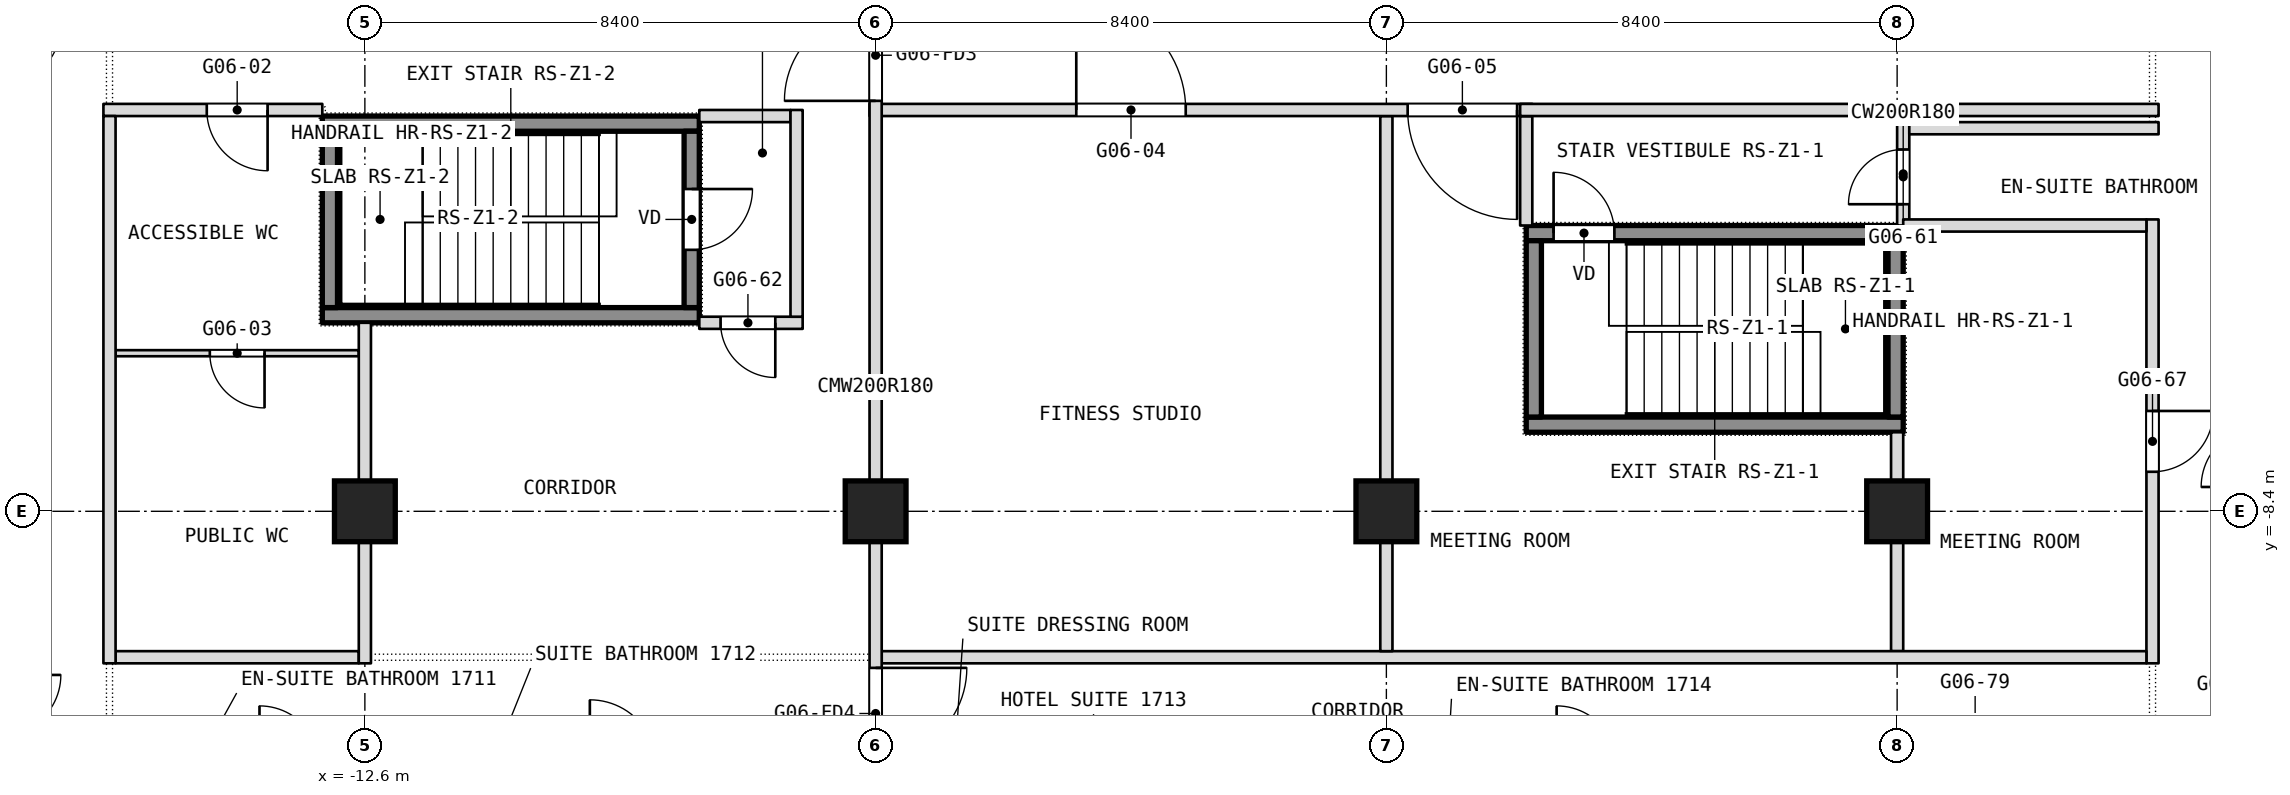
"""IFC4 building model, lengths in metres.
Left out: names, types, materials, properties, quantities, classifications, styles, units other than length and angle.
Written with IfcOpenShell. Run it as: python <this file> out.ifc"""

import sys

from ifc_helpers import new_model, si_unit, direction, frame, frame_2d, origin, origin_2d, place, context, subcontext, project, spatial, rectangle, extrude, element, fill, save


model = new_model("IFC4")
c1 = context("Model", 3, precision=1e-05, world=origin(), true_north=direction((0.0, 1.0)))
c2 = subcontext(c1, "Body", "Model", "MODEL_VIEW")
j1 = project(units=[si_unit("LENGTHUNIT", "METRE"), si_unit("PLANEANGLEUNIT", "RADIAN")], contexts=[c1])
p1 = place(None, origin())
s1 = spatial("IfcSite", under=j1, at=p1, CompositionType="ELEMENT")
p2 = place(p1, origin())
s2 = spatial("IfcBuilding", under=s1, at=p2, CompositionType="ELEMENT")
p3 = place(p2, frame((0.0, 0.0, 76.1)))
s3 = spatial("IfcBuildingStorey", under=s2, at=p3, CompositionType="ELEMENT", Elevation=76.1)
for number, where, z_axis, x_axis in (
    (1, (-12.6, -8.4, 0.0), (0.0, 0.0, 1.0), (1.0, 0.0, 0.0)),
    (2, (-4.2, -8.4, 0.0), (0.0, 0.0, 1.0), (1.0, 0.0, 0.0)),
    (3, (4.2, -8.4, 0.0), (0.0, 0.0, 1.0), (1.0, 0.0, 0.0)),
    (4, (12.6, -8.4, 0.0), (0.0, 0.0, 1.0), (1.0, 0.0, 0.0)),
):
    element("IfcColumn", number, at=place(p3, frame(where, z_axis=z_axis, x_axis=x_axis)), inside=s3, PredefinedType="COLUMN", context=c2, shape_type="SweptSolid", body=[
        extrude(rectangle(XDim=1.0, YDim=1.0, at=origin_2d()), origin(), (0.0, 0.0, 1.0), 3.6),
    ])
p4 = place(p3, frame((16.8, -10.9, 0.0), z_axis=(0.0, 0.0, 1.0), x_axis=(0.0, 1.0, 0.0)))
e5 = element("IfcWall", 5, at=p4, inside=s3, PredefinedType="PARTITIONING", context=c2, shape_type="SweptSolid", body=[
    extrude(rectangle(XDim=7.3, YDim=0.2, at=frame_2d((3.65, 0.0))), origin(), (0.0, 0.0, 1.0), 3.34),
])
p5 = place(p4, frame((3.15, 0.0, 0.0)))
e6 = element("IfcOpeningElement", 6, at=p5, cuts=e5, PredefinedType="OPENING", context=c2, shape_type="SweptSolid", body=[
    extrude(rectangle(XDim=1.0, YDim=2.1, at=frame_2d((0.5, 1.05))), frame((0.0, 0.1, 0.0), z_axis=(0.0, -1.0, 0.0), x_axis=(1.0, 0.0, 0.0)), (0.0, 0.0, 1.0), 0.2),
])
p6 = place(p3, frame((12.7, -3.7, 0.0), z_axis=(0.0, 0.0, 1.0), x_axis=(0.0, 1.0, 0.0)))
e7 = element("IfcWall", 7, at=p6, inside=s3, PredefinedType="PARTITIONING", context=c2, shape_type="SweptSolid", body=[
    extrude(rectangle(XDim=1.7, YDim=0.2, at=frame_2d((0.85, 0.0))), origin(), (0.0, 0.0, 1.0), 3.34),
])
p7 = place(p6, frame((0.35, 0.0, 0.0)))
e8 = element("IfcOpeningElement", 8, at=p7, cuts=e7, PredefinedType="OPENING", context=c2, shape_type="SweptSolid", body=[
    extrude(rectangle(XDim=0.9, YDim=2.1, at=frame_2d((0.45, 1.05))), frame((0.0, 0.1, 0.0), z_axis=(0.0, -1.0, 0.0), x_axis=(1.0, 0.0, 0.0)), (0.0, 0.0, 1.0), 0.2),
])
p8 = place(p3, frame((12.6, -10.7, 0.0), z_axis=(0.0, 0.0, 1.0), x_axis=(0.0, 1.0, 0.0)))
e9 = element("IfcWall", 9, at=p8, inside=s3, PredefinedType="PARTITIONING", context=c2, shape_type="SweptSolid", body=[
    extrude(rectangle(XDim=3.6, YDim=0.2, at=frame_2d((1.8, 0.0))), origin(), (0.0, 0.0, 1.0), 3.34),
])
p9 = place(p3, frame((-16.7, -10.8, 0.0), z_axis=(0.0, 0.0, 1.0), x_axis=(1.0, 0.0, 0.0)))
e10 = element("IfcWall", 10, at=p9, inside=s3, PredefinedType="PARTITIONING", context=c2, shape_type="SweptSolid", body=[
    extrude(rectangle(XDim=4.0, YDim=0.2, at=frame_2d((2.0, 0.0))), origin(), (0.0, 0.0, 1.0), 3.34),
])
p10 = place(p3, frame((-4.1, -10.8, 0.0), z_axis=(0.0, 0.0, 1.0), x_axis=(1.0, 0.0, 0.0)))
e11 = element("IfcWall", 11, at=p10, inside=s3, PredefinedType="PARTITIONING", context=c2, shape_type="SweptSolid", body=[
    extrude(rectangle(XDim=20.8, YDim=0.2, at=frame_2d((10.4, 0.0))), origin(), (0.0, 0.0, 1.0), 3.34),
])
p11 = place(p3, frame((6.5, -3.7, 0.0), z_axis=(0.0, 0.0, 1.0), x_axis=(0.0, 1.0, 0.0)))
e12 = element("IfcWall", 12, at=p11, inside=s3, PredefinedType="PARTITIONING", context=c2, shape_type="SweptSolid", body=[
    extrude(rectangle(XDim=1.8, YDim=0.2, at=frame_2d((0.9, 0.0))), origin(), (0.0, 0.0, 1.0), 3.34),
])
p12 = place(p3, frame((-16.7, -5.8, 0.0), z_axis=(0.0, 0.0, 1.0), x_axis=(1.0, 0.0, 0.0)))
e13 = element("IfcWall", 13, at=p12, inside=s3, PredefinedType="PARTITIONING", context=c2, shape_type="SweptSolid", body=[
    extrude(rectangle(XDim=4.0, YDim=0.1, at=frame_2d((2.0, 0.0))), origin(), (0.0, 0.0, 1.0), 3.34),
])
p13 = place(p12, frame((1.55, 0.0, 0.0)))
e14 = element("IfcOpeningElement", 14, at=p13, cuts=e13, PredefinedType="OPENING", context=c2, shape_type="SweptSolid", body=[
    extrude(rectangle(XDim=0.9, YDim=2.1, at=frame_2d((0.45, 1.05))), frame((0.0, 0.05, 0.0), z_axis=(0.0, -1.0, 0.0), x_axis=(1.0, 0.0, 0.0)), (0.0, 0.0, 1.0), 0.1),
])
p14 = place(p3, frame((-7.1, -5.3, 0.0), z_axis=(0.0, 0.0, 1.0), x_axis=(1.0, 0.0, 0.0)))
e15 = element("IfcWall", 15, at=p14, inside=s3, PredefinedType="PARTITIONING", context=c2, shape_type="SweptSolid", body=[
    extrude(rectangle(XDim=1.7, YDim=0.2, at=frame_2d((0.85, 0.0))), origin(), (0.0, 0.0, 1.0), 3.34),
])
p15 = place(p14, frame((0.35, 0.0, 0.0)))
e16 = element("IfcOpeningElement", 16, at=p15, cuts=e15, PredefinedType="OPENING", context=c2, shape_type="SweptSolid", body=[
    extrude(rectangle(XDim=0.9, YDim=2.1, at=frame_2d((0.45, 1.05))), frame((0.0, 0.1, 0.0), z_axis=(0.0, -1.0, 0.0), x_axis=(1.0, 0.0, 0.0)), (0.0, 0.0, 1.0), 0.2),
])
p16 = place(p3, frame((4.2, -10.7, 0.0), z_axis=(0.0, 0.0, 1.0), x_axis=(0.0, 1.0, 0.0)))
e17 = element("IfcWall", 17, at=p16, inside=s3, PredefinedType="PARTITIONING", context=c2, shape_type="SweptSolid", body=[
    extrude(rectangle(XDim=8.8, YDim=0.2, at=frame_2d((4.4, 0.0))), origin(), (0.0, 0.0, 1.0), 3.34),
])
p17 = place(p3, frame((12.7, -3.7, 0.0), z_axis=(0.0, 0.0, 1.0), x_axis=(1.0, 0.0, 0.0)))
e18 = element("IfcWall", 18, at=p17, inside=s3, PredefinedType="PARTITIONING", context=c2, shape_type="SweptSolid", body=[
    extrude(rectangle(XDim=4.0, YDim=0.2, at=frame_2d((2.0, 0.0))), origin(), (0.0, 0.0, 1.0), 3.34),
])
p18 = place(p3, frame((12.8, -2.1, 0.0), z_axis=(0.0, 0.0, 1.0), x_axis=(1.0, 0.0, 0.0)))
e19 = element("IfcWall", 19, at=p18, inside=s3, PredefinedType="PARTITIONING", context=c2, shape_type="SweptSolid", body=[
    extrude(rectangle(XDim=4.1, YDim=0.2, at=frame_2d((2.05, 0.0))), origin(), (0.0, 0.0, 1.0), 3.34),
])
p19 = place(p3, frame((-7.1, -1.9, 0.0), z_axis=(0.0, 0.0, 1.0), x_axis=(1.0, 0.0, 0.0)))
e20 = element("IfcWall", 20, at=p19, inside=s3, PredefinedType="PARTITIONING", context=c2, shape_type="SweptSolid", body=[
    extrude(rectangle(XDim=1.5, YDim=0.2, at=frame_2d((0.75, 0.0))), origin(), (0.0, 0.0, 1.0), 3.34),
])
p20 = place(p3, frame((-16.9, -1.8, 0.0), z_axis=(0.0, 0.0, 1.0), x_axis=(1.0, 0.0, 0.0)))
e21 = element("IfcWall", 21, at=p20, inside=s3, PredefinedType="PARTITIONING", context=c2, shape_type="SweptSolid", body=[
    extrude(rectangle(XDim=3.6, YDim=0.2, at=frame_2d((1.8, 0.0))), origin(), (0.0, 0.0, 1.0), 3.34),
])
p21 = place(p20, frame((1.7, 0.0, 0.0)))
e22 = element("IfcOpeningElement", 22, at=p21, cuts=e21, PredefinedType="OPENING", context=c2, shape_type="SweptSolid", body=[
    extrude(rectangle(XDim=1.0, YDim=2.1, at=frame_2d((0.5, 1.05))), frame((0.0, 0.1, 0.0), z_axis=(0.0, -1.0, 0.0), x_axis=(1.0, 0.0, 0.0)), (0.0, 0.0, 1.0), 0.2),
])
p22 = place(p3, frame((-4.3, -1.8, 0.0), z_axis=(0.0, 0.0, 1.0), x_axis=(1.0, 0.0, 0.0)))
e23 = element("IfcWall", 23, at=p22, inside=s3, PredefinedType="PARTITIONING", context=c2, shape_type="SweptSolid", body=[
    extrude(rectangle(XDim=10.9, YDim=0.2, at=frame_2d((5.45, 0.0))), origin(), (0.0, 0.0, 1.0), 3.34),
])
p23 = place(p22, frame((3.4, 0.0, 0.0)))
e24 = element("IfcOpeningElement", 24, at=p23, cuts=e23, PredefinedType="OPENING", context=c2, shape_type="SweptSolid", body=[
    extrude(rectangle(XDim=1.8, YDim=2.1, at=frame_2d((0.9, 1.05))), frame((0.0, 0.1, 0.0), z_axis=(0.0, -1.0, 0.0), x_axis=(1.0, 0.0, 0.0)), (0.0, 0.0, 1.0), 0.2),
])
p24 = place(p22, frame((8.85, 0.0, 0.0)))
e25 = element("IfcOpeningElement", 25, at=p24, cuts=e23, PredefinedType="OPENING", context=c2, shape_type="SweptSolid", body=[
    extrude(rectangle(XDim=1.8, YDim=2.1, at=frame_2d((0.9, 1.05))), frame((0.0, 0.1, 0.0), z_axis=(0.0, -1.0, 0.0), x_axis=(1.0, 0.0, 0.0)), (0.0, 0.0, 1.0), 0.2),
])
p25 = place(p3, frame((6.4, -1.8, 0.0), z_axis=(0.0, 0.0, 1.0), x_axis=(1.0, 0.0, 0.0)))
e26 = element("IfcWall", 26, at=p25, inside=s3, PredefinedType="PARTITIONING", context=c2, shape_type="SweptSolid", body=[
    extrude(rectangle(XDim=10.5, YDim=0.2, at=frame_2d((5.25, 0.0))), origin(), (0.0, 0.0, 1.0), 3.34),
])
p26 = place(p3, frame((-4.2, -12.7, 0.0), z_axis=(0.0, 0.0, 1.0), x_axis=(0.0, 1.0, 0.0)))
e27 = element("IfcWall", 27, at=p26, inside=s3, PredefinedType="PARTITIONING", context=c2, shape_type="SweptSolid", body=[
    extrude(rectangle(XDim=12.7, YDim=0.2, at=frame_2d((6.35, 0.0))), origin(), (0.0, 0.0, 1.0), 3.34),
])
p27 = place(p26, frame((11.05, 0.0, 0.0)))
e28 = element("IfcOpeningElement", 28, at=p27, cuts=e27, PredefinedType="OPENING", context=c2, shape_type="SweptSolid", body=[
    extrude(rectangle(XDim=1.5, YDim=2.1, at=frame_2d((0.75, 1.05))), frame((0.0, 0.1, 0.0), z_axis=(0.0, -1.0, 0.0), x_axis=(1.0, 0.0, 0.0)), (0.0, 0.0, 1.0), 0.2),
])
p28 = place(p26, frame((0.225, 0.0, 0.0)))
e29 = element("IfcOpeningElement", 29, at=p28, cuts=e27, PredefinedType="OPENING", context=c2, shape_type="SweptSolid", body=[
    extrude(rectangle(XDim=1.5, YDim=2.1, at=frame_2d((0.75, 1.05))), frame((0.0, 0.1, 0.0), z_axis=(0.0, -1.0, 0.0), x_axis=(1.0, 0.0, 0.0)), (0.0, 0.0, 1.0), 0.2),
])
p29 = place(p3, frame((-5.5, -5.2, 0.0), z_axis=(0.0, 0.0, 1.0), x_axis=(0.0, 1.0, 0.0)))
e30 = element("IfcWall", 30, at=p29, inside=s3, PredefinedType="PARTITIONING", context=c2, shape_type="SweptSolid", body=[
    extrude(rectangle(XDim=3.4, YDim=0.2, at=frame_2d((1.7, 0.0))), origin(), (0.0, 0.0, 1.0), 3.34),
])
p30 = place(p3, frame((-12.6, -10.9, 0.0), z_axis=(0.0, 0.0, 1.0), x_axis=(0.0, 1.0, 0.0)))
e31 = element("IfcWall", 31, at=p30, inside=s3, PredefinedType="PARTITIONING", context=c2, shape_type="SweptSolid", body=[
    extrude(rectangle(XDim=5.6, YDim=0.2, at=frame_2d((2.8, 0.0))), origin(), (0.0, 0.0, 1.0), 3.34),
])
p31 = place(p3, frame((-16.8, -10.9, 0.0), z_axis=(0.0, 0.0, 1.0), x_axis=(0.0, 1.0, 0.0)))
e32 = element("IfcWall", 32, at=p31, inside=s3, PredefinedType="PARTITIONING", context=c2, shape_type="SweptSolid", body=[
    extrude(rectangle(XDim=9.0, YDim=0.2, at=frame_2d((4.5, 0.0))), origin(), (0.0, 0.0, 1.0), 3.34),
])
p32 = place(p3, frame((6.5, -6.975, 0.1), z_axis=(0.0, 0.0, 1.0), x_axis=(1.0, 0.0, 0.0)))
e33 = element("IfcWall", 33, at=p32, inside=s3, PredefinedType="SHEAR", context=c2, shape_type="SweptSolid", body=[
    extrude(rectangle(XDim=6.2, YDim=0.25, at=frame_2d((3.1, 0.0))), origin(), (0.0, 0.0, 1.0), 3.6),
])
p33 = place(p3, frame((6.5, -3.825, 0.1), z_axis=(0.0, 0.0, 1.0), x_axis=(1.0, 0.0, 0.0)))
e34 = element("IfcWall", 34, at=p33, inside=s3, PredefinedType="SHEAR", context=c2, shape_type="SweptSolid", body=[
    extrude(rectangle(XDim=6.2, YDim=0.25, at=frame_2d((3.1, 0.0))), origin(), (0.0, 0.0, 1.0), 3.6),
])
p34 = place(p33, frame((0.45, 0.0, 0.0)))
e35 = element("IfcOpeningElement", 35, at=p34, cuts=e34, PredefinedType="OPENING", context=c2, shape_type="SweptSolid", body=[
    extrude(rectangle(XDim=1.0, YDim=2.1, at=frame_2d((0.5, 1.05))), frame((0.0, 0.125, 0.0), z_axis=(0.0, -1.0, 0.0), x_axis=(1.0, 0.0, 0.0)), (0.0, 0.0, 1.0), 0.25),
])
for number, where, z_axis, x_axis in (
    (36, (6.625, -6.85, 0.1), (0.0, 0.0, 1.0), (0.0, 1.0, 0.0)),
    (37, (12.575, -6.85, 0.1), (0.0, 0.0, 1.0), (0.0, 1.0, 0.0)),
):
    element("IfcWall", number, at=place(p3, frame(where, z_axis=z_axis, x_axis=x_axis)), inside=s3, PredefinedType="SHEAR", context=c2, shape_type="SweptSolid", body=[
        extrude(rectangle(XDim=2.9, YDim=0.25, at=frame_2d((1.45, 0.0))), origin(), (0.0, 0.0, 1.0), 3.6),
    ])
for number, where, z_axis, x_axis in (
    (38, (-13.3, -5.175, 0.1), (0.0, 0.0, 1.0), (1.0, 0.0, 0.0)),
    (39, (-13.3, -2.025, 0.1), (0.0, 0.0, 1.0), (1.0, 0.0, 0.0)),
):
    element("IfcWall", number, at=place(p3, frame(where, z_axis=z_axis, x_axis=x_axis)), inside=s3, PredefinedType="SHEAR", context=c2, shape_type="SweptSolid", body=[
        extrude(rectangle(XDim=6.2, YDim=0.25, at=frame_2d((3.1, 0.0))), origin(), (0.0, 0.0, 1.0), 3.6),
    ])
p35 = place(p3, frame((-13.175, -5.05, 0.1), z_axis=(0.0, 0.0, 1.0), x_axis=(0.0, 1.0, 0.0)))
e40 = element("IfcWall", 40, at=p35, inside=s3, PredefinedType="SHEAR", context=c2, shape_type="SweptSolid", body=[
    extrude(rectangle(XDim=2.9, YDim=0.25, at=frame_2d((1.45, 0.0))), origin(), (0.0, 0.0, 1.0), 3.6),
])
p36 = place(p3, frame((-7.225, -5.05, 0.1), z_axis=(0.0, 0.0, 1.0), x_axis=(0.0, 1.0, 0.0)))
e41 = element("IfcWall", 41, at=p36, inside=s3, PredefinedType="SHEAR", context=c2, shape_type="SweptSolid", body=[
    extrude(rectangle(XDim=2.9, YDim=0.25, at=frame_2d((1.45, 0.0))), origin(), (0.0, 0.0, 1.0), 3.6),
])
p37 = place(p36, frame((0.95, 0.0, 0.0)))
e42 = element("IfcOpeningElement", 42, at=p37, cuts=e41, PredefinedType="OPENING", context=c2, shape_type="SweptSolid", body=[
    extrude(rectangle(XDim=1.0, YDim=2.1, at=frame_2d((0.5, 1.05))), frame((0.0, 0.125, 0.0), z_axis=(0.0, -1.0, 0.0), x_axis=(1.0, 0.0, 0.0)), (0.0, 0.0, 1.0), 0.25),
])
p38 = place(p5, origin())
e43 = element("IfcDoor", 43, at=p38, inside=s3, OperationType="SINGLE_SWING_LEFT", PredefinedType="DOOR", context=c2, shape_type="SweptSolid", body=[
    extrude(rectangle(XDim=1.0, YDim=2.1, at=frame_2d((0.5, 1.05))), frame((0.0, 0.025, 0.0), z_axis=(0.0, -1.0, 0.0), x_axis=(1.0, 0.0, 0.0)), (0.0, 0.0, 1.0), 0.05),
])
fill(e6, e43)
p39 = place(p7, origin())
e44 = element("IfcDoor", 44, at=p39, inside=s3, OperationType="SINGLE_SWING_RIGHT", PredefinedType="DOOR", context=c2, shape_type="SweptSolid", body=[
    extrude(rectangle(XDim=0.9, YDim=2.1, at=frame_2d((0.45, 1.05))), frame((0.0, 0.025, 0.0), z_axis=(0.0, -1.0, 0.0), x_axis=(1.0, 0.0, 0.0)), (0.0, 0.0, 1.0), 0.05),
])
fill(e8, e44)
p40 = place(p13, origin())
e45 = element("IfcDoor", 45, at=p40, inside=s3, OperationType="SINGLE_SWING_LEFT", PredefinedType="DOOR", context=c2, shape_type="SweptSolid", body=[
    extrude(rectangle(XDim=0.9, YDim=2.1, at=frame_2d((0.45, 1.05))), frame((0.0, 0.025, 0.0), z_axis=(0.0, -1.0, 0.0), x_axis=(1.0, 0.0, 0.0)), (0.0, 0.0, 1.0), 0.05),
])
fill(e14, e45)
p41 = place(p15, origin())
e46 = element("IfcDoor", 46, at=p41, inside=s3, OperationType="SINGLE_SWING_RIGHT", PredefinedType="DOOR", context=c2, shape_type="SweptSolid", body=[
    extrude(rectangle(XDim=0.9, YDim=2.1, at=frame_2d((0.45, 1.05))), frame((0.0, 0.025, 0.0), z_axis=(0.0, -1.0, 0.0), x_axis=(1.0, 0.0, 0.0)), (0.0, 0.0, 1.0), 0.05),
])
fill(e16, e46)
p42 = place(p21, origin())
e47 = element("IfcDoor", 47, at=p42, inside=s3, OperationType="SINGLE_SWING_RIGHT", PredefinedType="DOOR", context=c2, shape_type="SweptSolid", body=[
    extrude(rectangle(XDim=1.0, YDim=2.1, at=frame_2d((0.5, 1.05))), frame((0.0, 0.025, 0.0), z_axis=(0.0, -1.0, 0.0), x_axis=(1.0, 0.0, 0.0)), (0.0, 0.0, 1.0), 0.05),
])
fill(e22, e47)
p43 = place(p23, origin())
e48 = element("IfcDoor", 48, at=p43, inside=s3, OperationType="DOUBLE_DOOR_SINGLE_SWING", PredefinedType="DOOR", context=c2, shape_type="SweptSolid", body=[
    extrude(rectangle(XDim=1.8, YDim=2.1, at=frame_2d((0.9, 1.05))), frame((0.0, 0.025, 0.0), z_axis=(0.0, -1.0, 0.0), x_axis=(1.0, 0.0, 0.0)), (0.0, 0.0, 1.0), 0.05),
])
fill(e24, e48)
p44 = place(p24, origin())
e49 = element("IfcDoor", 49, at=p44, inside=s3, OperationType="DOUBLE_DOOR_SINGLE_SWING", PredefinedType="DOOR", context=c2, shape_type="SweptSolid", body=[
    extrude(rectangle(XDim=1.8, YDim=2.1, at=frame_2d((0.9, 1.05))), frame((0.0, 0.025, 0.0), z_axis=(0.0, -1.0, 0.0), x_axis=(1.0, 0.0, 0.0)), (0.0, 0.0, 1.0), 0.05),
])
fill(e25, e49)
p45 = place(p34, origin())
e50 = element("IfcDoor", 50, at=p45, inside=s3, OperationType="SINGLE_SWING_LEFT", PredefinedType="DOOR", context=c2, shape_type="SweptSolid", body=[
    extrude(rectangle(XDim=1.0, YDim=2.1, at=frame_2d((0.5, 1.05))), frame((0.0, 0.025, 0.0), z_axis=(0.0, -1.0, 0.0), x_axis=(1.0, 0.0, 0.0)), (0.0, 0.0, 1.0), 0.05),
])
fill(e35, e50)
p46 = place(p37, origin())
e51 = element("IfcDoor", 51, at=p46, inside=s3, OperationType="SINGLE_SWING_LEFT", PredefinedType="DOOR", context=c2, shape_type="SweptSolid", body=[
    extrude(rectangle(XDim=1.0, YDim=2.1, at=frame_2d((0.5, 1.05))), frame((0.0, 0.025, 0.0), z_axis=(0.0, -1.0, 0.0), x_axis=(1.0, 0.0, 0.0)), (0.0, 0.0, 1.0), 0.05),
])
fill(e42, e51)
p47 = place(p27, origin())
e52 = element("IfcDoor", 52, at=p47, inside=s3, OperationType="DOUBLE_DOOR_DOUBLE_SWING", PredefinedType="DOOR", context=c2, shape_type="SweptSolid", body=[
    extrude(rectangle(XDim=1.5, YDim=2.1, at=frame_2d((0.75, 1.05))), frame((0.0, 0.025, 0.0), z_axis=(0.0, -1.0, 0.0), x_axis=(1.0, 0.0, 0.0)), (0.0, 0.0, 1.0), 0.05),
])
fill(e28, e52)
p48 = place(p28, origin())
e53 = element("IfcDoor", 53, at=p48, inside=s3, OperationType="DOUBLE_DOOR_DOUBLE_SWING", PredefinedType="DOOR", context=c2, shape_type="SweptSolid", body=[
    extrude(rectangle(XDim=1.5, YDim=2.1, at=frame_2d((0.75, 1.05))), frame((0.0, 0.025, 0.0), z_axis=(0.0, -1.0, 0.0), x_axis=(1.0, 0.0, 0.0)), (0.0, 0.0, 1.0), 0.05),
])
fill(e29, e53)
save(model, sys.argv[1])
